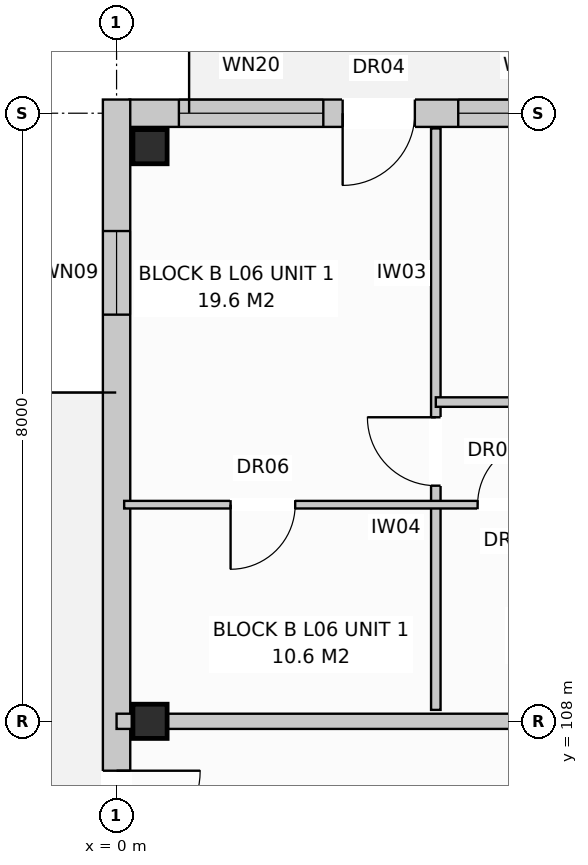
"""IFC4 building model, lengths in metres.
Left out: names, types, materials, properties, quantities, classifications, styles, units other than length and angle.
Written with IfcOpenShell. Run it as: python <this file> out.ifc"""

import sys

from ifc_helpers import new_model, si_unit, direction, frame, frame_2d, origin, origin_with_axes, origin_2d, place, context, subcontext, project, spatial, rectangle, extrude, element, fill, save


model = new_model("IFC4")
c1 = context("Model", 3, precision=1e-05, world=origin(), true_north=direction((0.0, 1.0)))
c2 = subcontext(c1, "Body", "Model", "MODEL_VIEW")
j1 = project(units=[si_unit("LENGTHUNIT", "METRE"), si_unit("PLANEANGLEUNIT", "RADIAN")], contexts=[c1])
p1 = place(None, origin())
s1 = spatial("IfcSite", under=j1, at=p1, CompositionType="ELEMENT")
p2 = place(p1, origin())
s2 = spatial("IfcBuilding", under=s1, at=p2, CompositionType="ELEMENT")
p3 = place(p2, frame((0.0, 0.0, 20.8)))
s3 = spatial("IfcBuildingStorey", under=s2, at=p3, CompositionType="ELEMENT", Elevation=20.8)
for number, where, z_axis, x_axis in (
    (1, (0.44, 108.0, 0.0), (0.0, 0.0, 1.0), (1.0, 0.0, 0.0)),
    (2, (0.44, 115.56, 0.0), (0.0, 0.0, 1.0), (1.0, 0.0, 0.0)),
):
    element("IfcColumn", number, at=place(p3, frame(where, z_axis=z_axis, x_axis=x_axis)), inside=s3, PredefinedType="COLUMN", context=c2, shape_type="SweptSolid", body=[
        extrude(rectangle(XDim=0.45, YDim=0.45, at=origin_2d()), origin(), (0.0, 0.0, 1.0), 3.2),
    ])
p4 = place(p3, frame((0.17, 116.0, 0.0), z_axis=(0.0, 0.0, 1.0), x_axis=(1.0, 0.0, 0.0)))
e3 = element("IfcWall", 3, at=p4, inside=s3, PredefinedType="STANDARD", context=c2, shape_type="SweptSolid", body=[
    extrude(rectangle(XDim=54.86, YDim=0.36, at=frame_2d((27.43, 0.0))), origin(), (0.0, 0.0, 1.0), 2.95),
])
p5 = place(p4, frame((2.804, 0.0, 0.0)))
e4 = element("IfcOpeningElement", 4, at=p5, cuts=e3, PredefinedType="OPENING", context=c2, shape_type="SweptSolid", body=[
    extrude(rectangle(XDim=0.95, YDim=2.1, at=frame_2d((0.475, 1.05))), frame((0.0, 0.192, 0.0), z_axis=(0.0, -1.0, 0.0), x_axis=(1.0, 0.0, 0.0)), (0.0, 0.0, 1.0), 0.384),
])
p6 = place(p4, frame((16.304, 0.0, 0.0)))
e5 = element("IfcOpeningElement", 5, at=p6, cuts=e3, PredefinedType="OPENING", context=c2, shape_type="SweptSolid", body=[
    extrude(rectangle(XDim=0.95, YDim=2.1, at=frame_2d((0.475, 1.05))), frame((0.0, 0.192, 0.0), z_axis=(0.0, -1.0, 0.0), x_axis=(1.0, 0.0, 0.0)), (0.0, 0.0, 1.0), 0.384),
])
p7 = place(p4, frame((30.804, 0.0, 0.0)))
e6 = element("IfcOpeningElement", 6, at=p7, cuts=e3, PredefinedType="OPENING", context=c2, shape_type="SweptSolid", body=[
    extrude(rectangle(XDim=0.95, YDim=2.1, at=frame_2d((0.475, 1.05))), frame((0.0, 0.192, 0.0), z_axis=(0.0, -1.0, 0.0), x_axis=(1.0, 0.0, 0.0)), (0.0, 0.0, 1.0), 0.384),
])
p8 = place(p4, frame((48.8, 0.0, 0.0)))
e7 = element("IfcOpeningElement", 7, at=p8, cuts=e3, PredefinedType="OPENING", context=c2, shape_type="SweptSolid", body=[
    extrude(rectangle(XDim=0.95, YDim=2.1, at=frame_2d((0.475, 1.05))), frame((0.0, 0.192, 0.0), z_axis=(0.0, -1.0, 0.0), x_axis=(1.0, 0.0, 0.0)), (0.0, 0.0, 1.0), 0.384),
])
p9 = place(p4, frame((0.65, 0.0, 0.8)))
e8 = element("IfcOpeningElement", 8, at=p9, cuts=e3, PredefinedType="OPENING", context=c2, shape_type="SweptSolid", body=[
    extrude(rectangle(XDim=1.9, YDim=1.85, at=frame_2d((0.95, 0.925))), frame((0.0, 0.192, 0.0), z_axis=(0.0, -1.0, 0.0), x_axis=(1.0, 0.0, 0.0)), (0.0, 0.0, 1.0), 0.384),
])
p10 = place(p4, frame((4.325, 0.0, 0.8)))
e9 = element("IfcOpeningElement", 9, at=p10, cuts=e3, PredefinedType="OPENING", context=c2, shape_type="SweptSolid", body=[
    extrude(rectangle(XDim=1.95, YDim=1.65, at=frame_2d((0.975, 0.825))), frame((0.0, 0.192, 0.0), z_axis=(0.0, -1.0, 0.0), x_axis=(1.0, 0.0, 0.0)), (0.0, 0.0, 1.0), 0.384),
])
p11 = place(p4, frame((10.1, 0.0, 0.8)))
e10 = element("IfcOpeningElement", 10, at=p11, cuts=e3, PredefinedType="OPENING", context=c2, shape_type="SweptSolid", body=[
    extrude(rectangle(XDim=1.8, YDim=1.7, at=frame_2d((0.9, 0.85))), frame((0.0, 0.192, 0.0), z_axis=(0.0, -1.0, 0.0), x_axis=(1.0, 0.0, 0.0)), (0.0, 0.0, 1.0), 0.384),
])
p12 = place(p4, frame((14.55, 0.0, 0.72)))
e11 = element("IfcOpeningElement", 11, at=p12, cuts=e3, PredefinedType="OPENING", context=c2, shape_type="SweptSolid", body=[
    extrude(rectangle(XDim=1.1, YDim=1.5, at=frame_2d((0.55, 0.75))), frame((0.0, 0.192, 0.0), z_axis=(0.0, -1.0, 0.0), x_axis=(1.0, 0.0, 0.0)), (0.0, 0.0, 1.0), 0.384),
])
p13 = place(p4, frame((18.025, 0.0, 0.8)))
e12 = element("IfcOpeningElement", 12, at=p13, cuts=e3, PredefinedType="OPENING", context=c2, shape_type="SweptSolid", body=[
    extrude(rectangle(XDim=1.95, YDim=1.65, at=frame_2d((0.975, 0.825))), frame((0.0, 0.192, 0.0), z_axis=(0.0, -1.0, 0.0), x_axis=(1.0, 0.0, 0.0)), (0.0, 0.0, 1.0), 0.384),
])
p14 = place(p4, frame((22.8, 0.0, 0.8)))
e13 = element("IfcOpeningElement", 13, at=p14, cuts=e3, PredefinedType="OPENING", context=c2, shape_type="SweptSolid", body=[
    extrude(rectangle(XDim=1.8, YDim=1.7, at=frame_2d((0.9, 0.85))), frame((0.0, 0.192, 0.0), z_axis=(0.0, -1.0, 0.0), x_axis=(1.0, 0.0, 0.0)), (0.0, 0.0, 1.0), 0.384),
])
p15 = place(p4, frame((28.85, 0.0, 0.72)))
e14 = element("IfcOpeningElement", 14, at=p15, cuts=e3, PredefinedType="OPENING", context=c2, shape_type="SweptSolid", body=[
    extrude(rectangle(XDim=1.1, YDim=1.5, at=frame_2d((0.55, 0.75))), frame((0.0, 0.192, 0.0), z_axis=(0.0, -1.0, 0.0), x_axis=(1.0, 0.0, 0.0)), (0.0, 0.0, 1.0), 0.384),
])
p16 = place(p4, frame((34.825, 0.0, 0.8)))
e15 = element("IfcOpeningElement", 15, at=p16, cuts=e3, PredefinedType="OPENING", context=c2, shape_type="SweptSolid", body=[
    extrude(rectangle(XDim=1.95, YDim=1.65, at=frame_2d((0.975, 0.825))), frame((0.0, 0.192, 0.0), z_axis=(0.0, -1.0, 0.0), x_axis=(1.0, 0.0, 0.0)), (0.0, 0.0, 1.0), 0.384),
])
p17 = place(p4, frame((38.3, 0.0, 0.8)))
e16 = element("IfcOpeningElement", 16, at=p17, cuts=e3, PredefinedType="OPENING", context=c2, shape_type="SweptSolid", body=[
    extrude(rectangle(XDim=1.8, YDim=1.7, at=frame_2d((0.9, 0.85))), frame((0.0, 0.192, 0.0), z_axis=(0.0, -1.0, 0.0), x_axis=(1.0, 0.0, 0.0)), (0.0, 0.0, 1.0), 0.384),
])
p18 = place(p4, frame((42.95, 0.0, 0.8)))
e17 = element("IfcOpeningElement", 17, at=p18, cuts=e3, PredefinedType="OPENING", context=c2, shape_type="SweptSolid", body=[
    extrude(rectangle(XDim=1.9, YDim=1.85, at=frame_2d((0.95, 0.925))), frame((0.0, 0.192, 0.0), z_axis=(0.0, -1.0, 0.0), x_axis=(1.0, 0.0, 0.0)), (0.0, 0.0, 1.0), 0.384),
])
p19 = place(p4, frame((51.825, 0.0, 0.8)))
e18 = element("IfcOpeningElement", 18, at=p19, cuts=e3, PredefinedType="OPENING", context=c2, shape_type="SweptSolid", body=[
    extrude(rectangle(XDim=1.95, YDim=1.65, at=frame_2d((0.975, 0.825))), frame((0.0, 0.192, 0.0), z_axis=(0.0, -1.0, 0.0), x_axis=(1.0, 0.0, 0.0)), (0.0, 0.0, 1.0), 0.384),
])
p20 = place(p3, frame((0.0, 97.42, 0.0), z_axis=(0.0, 0.0, 1.0), x_axis=(0.0, 1.0, 0.0)))
e19 = element("IfcWall", 19, at=p20, inside=s3, PredefinedType="STANDARD", context=c2, shape_type="SweptSolid", body=[
    extrude(rectangle(XDim=18.76, YDim=0.36, at=frame_2d((9.38, 0.0))), origin(), (0.0, 0.0, 1.0), 2.95),
])
p21 = place(p20, frame((8.83, 0.0, 0.0)))
e20 = element("IfcOpeningElement", 20, at=p21, cuts=e19, PredefinedType="OPENING", context=c2, shape_type="SweptSolid", body=[
    extrude(rectangle(XDim=1.1, YDim=2.1, at=frame_2d((0.55, 1.05))), frame((0.0, 0.192, 0.0), z_axis=(0.0, -1.0, 0.0), x_axis=(1.0, 0.0, 0.0)), (0.0, 0.0, 1.0), 0.384),
])
p22 = place(p20, frame((1.73, 0.0, 0.72)))
e21 = element("IfcOpeningElement", 21, at=p22, cuts=e19, PredefinedType="OPENING", context=c2, shape_type="SweptSolid", body=[
    extrude(rectangle(XDim=1.1, YDim=1.5, at=frame_2d((0.55, 0.75))), frame((0.0, 0.192, 0.0), z_axis=(0.0, -1.0, 0.0), x_axis=(1.0, 0.0, 0.0)), (0.0, 0.0, 1.0), 0.384),
])
p23 = place(p20, frame((15.93, 0.0, 0.72)))
e22 = element("IfcOpeningElement", 22, at=p23, cuts=e19, PredefinedType="OPENING", context=c2, shape_type="SweptSolid", body=[
    extrude(rectangle(XDim=1.1, YDim=1.5, at=frame_2d((0.55, 0.75))), frame((0.0, 0.192, 0.0), z_axis=(0.0, -1.0, 0.0), x_axis=(1.0, 0.0, 0.0)), (0.0, 0.0, 1.0), 0.384),
])
p24 = place(p3, frame((0.0, 108.0, 0.0), z_axis=(0.0, 0.0, 1.0), x_axis=(1.0, 0.0, 0.0)))
e23 = element("IfcWall", 23, at=p24, inside=s3, PredefinedType="PARTITIONING", context=c2, shape_type="SweptSolid", body=[
    extrude(rectangle(XDim=13.8, YDim=0.2, at=frame_2d((6.9, 0.0))), origin(), (0.0, 0.0, 1.0), 2.39),
])
p25 = place(p24, frame((9.6, 0.0, 0.0)))
e24 = element("IfcOpeningElement", 24, at=p25, cuts=e23, PredefinedType="OPENING", context=c2, shape_type="SweptSolid", body=[
    extrude(rectangle(XDim=0.95, YDim=2.15, at=frame_2d((0.475, 1.075))), frame((0.0, 0.112, 0.0), z_axis=(0.0, -1.0, 0.0), x_axis=(1.0, 0.0, 0.0)), (0.0, 0.0, 1.0), 0.224),
])
p26 = place(p3, frame((4.2, 108.15, 0.0), z_axis=(0.0, 0.0, 1.0), x_axis=(0.0, 1.0, 0.0)))
e25 = element("IfcWall", 25, at=p26, inside=s3, PredefinedType="PARTITIONING", context=c2, shape_type="SweptSolid", body=[
    extrude(rectangle(XDim=7.65, YDim=0.125, at=frame_2d((3.825, 0.0))), origin(), (0.0, 0.0, 1.0), 2.95),
])
p27 = place(p26, frame((2.95, 0.0, 0.0)))
e26 = element("IfcOpeningElement", 26, at=p27, cuts=e25, PredefinedType="OPENING", context=c2, shape_type="SweptSolid", body=[
    extrude(rectangle(XDim=0.9, YDim=2.1, at=frame_2d((0.45, 1.05))), frame((0.0, 0.074, 0.0), z_axis=(0.0, -1.0, 0.0), x_axis=(1.0, 0.0, 0.0)), (0.0, 0.0, 1.0), 0.149),
])
p28 = place(p3, frame((0.1, 110.85, 0.0), z_axis=(0.0, 0.0, 1.0), x_axis=(1.0, 0.0, 0.0)))
e27 = element("IfcWall", 27, at=p28, inside=s3, PredefinedType="PARTITIONING", context=c2, shape_type="SweptSolid", body=[
    extrude(rectangle(XDim=8.6, YDim=0.1, at=frame_2d((4.3, 0.0))), origin(), (0.0, 0.0, 1.0), 2.95),
])
p29 = place(p28, frame((1.4, 0.0, 0.0)))
e28 = element("IfcOpeningElement", 28, at=p29, cuts=e27, PredefinedType="OPENING", context=c2, shape_type="SweptSolid", body=[
    extrude(rectangle(XDim=0.85, YDim=2.05, at=frame_2d((0.425, 1.025))), frame((0.0, 0.062, 0.0), z_axis=(0.0, -1.0, 0.0), x_axis=(1.0, 0.0, 0.0)), (0.0, 0.0, 1.0), 0.124),
])
p30 = place(p28, frame((4.65, 0.0, 0.0)))
e29 = element("IfcOpeningElement", 29, at=p30, cuts=e27, PredefinedType="OPENING", context=c2, shape_type="SweptSolid", body=[
    extrude(rectangle(XDim=0.85, YDim=2.05, at=frame_2d((0.425, 1.025))), frame((0.0, 0.062, 0.0), z_axis=(0.0, -1.0, 0.0), x_axis=(1.0, 0.0, 0.0)), (0.0, 0.0, 1.0), 0.124),
])
p31 = place(p28, frame((6.8, 0.0, 0.0)))
e30 = element("IfcOpeningElement", 30, at=p31, cuts=e27, PredefinedType="OPENING", context=c2, shape_type="SweptSolid", body=[
    extrude(rectangle(XDim=0.85, YDim=2.1, at=frame_2d((0.425, 1.05))), frame((0.0, 0.062, 0.0), z_axis=(0.0, -1.0, 0.0), x_axis=(1.0, 0.0, 0.0)), (0.0, 0.0, 1.0), 0.124),
])
p32 = place(p3, frame((4.2, 112.2, 0.0), z_axis=(0.0, 0.0, 1.0), x_axis=(1.0, 0.0, 0.0)))
e31 = element("IfcWall", 31, at=p32, inside=s3, PredefinedType="PARTITIONING", context=c2, shape_type="SweptSolid", body=[
    extrude(rectangle(XDim=4.5, YDim=0.125, at=frame_2d((2.25, 0.0))), origin(), (0.0, 0.0, 1.0), 2.95),
])
p33 = place(p32, frame((1.6, 0.0, 0.0)))
e32 = element("IfcOpeningElement", 32, at=p33, cuts=e31, PredefinedType="OPENING", context=c2, shape_type="SweptSolid", body=[
    extrude(rectangle(XDim=0.9, YDim=2.1, at=frame_2d((0.45, 1.05))), frame((0.0, 0.074, 0.0), z_axis=(0.0, -1.0, 0.0), x_axis=(1.0, 0.0, 0.0)), (0.0, 0.0, 1.0), 0.149),
])
p34 = place(p5, frame((0.95, 0.0, 0.0), z_axis=(0.0, 0.0, 1.0), x_axis=(-1.0, 0.0, 0.0)))
e33 = element("IfcDoor", 33, at=p34, inside=s3, OperationType="SINGLE_SWING_LEFT", PredefinedType="DOOR", context=c2, shape_type="SweptSolid", body=[
    extrude(rectangle(XDim=0.95, YDim=2.1, at=frame_2d((0.475, 1.05))), frame((0.0, 0.025, 0.0), z_axis=(0.0, -1.0, 0.0), x_axis=(1.0, 0.0, 0.0)), (0.0, 0.0, 1.0), 0.05),
])
fill(e4, e33)
p35 = place(p9, origin_with_axes())
e34 = element("IfcWindow", 34, at=p35, inside=s3, PartitioningType="SINGLE_PANEL", PredefinedType="WINDOW", context=c2, shape_type="SweptSolid", body=[
    extrude(rectangle(XDim=1.9, YDim=1.85, at=frame_2d((0.95, 0.925))), frame((0.0, 0.03, 0.0), z_axis=(0.0, -1.0, 0.0), x_axis=(1.0, 0.0, 0.0)), (0.0, 0.0, 1.0), 0.06),
])
fill(e8, e34)
p36 = place(p10, origin_with_axes())
e35 = element("IfcWindow", 35, at=p36, inside=s3, PartitioningType="SINGLE_PANEL", PredefinedType="WINDOW", context=c2, shape_type="SweptSolid", body=[
    extrude(rectangle(XDim=1.95, YDim=1.65, at=frame_2d((0.975, 0.825))), frame((0.0, 0.03, 0.0), z_axis=(0.0, -1.0, 0.0), x_axis=(1.0, 0.0, 0.0)), (0.0, 0.0, 1.0), 0.06),
])
fill(e9, e35)
p37 = place(p21, frame((1.1, 0.0, 0.0), z_axis=(0.0, 0.0, 1.0), x_axis=(-1.0, 0.0, 0.0)))
e36 = element("IfcDoor", 36, at=p37, inside=s3, OperationType="SINGLE_SWING_RIGHT", PredefinedType="DOOR", context=c2, shape_type="SweptSolid", body=[
    extrude(rectangle(XDim=1.1, YDim=2.1, at=frame_2d((0.55, 1.05))), frame((0.0, 0.025, 0.0), z_axis=(0.0, -1.0, 0.0), x_axis=(1.0, 0.0, 0.0)), (0.0, 0.0, 1.0), 0.05),
])
fill(e20, e36)
p38 = place(p23, origin_with_axes())
e37 = element("IfcWindow", 37, at=p38, inside=s3, PartitioningType="SINGLE_PANEL", PredefinedType="WINDOW", context=c2, shape_type="SweptSolid", body=[
    extrude(rectangle(XDim=1.1, YDim=1.5, at=frame_2d((0.55, 0.75))), frame((0.0, 0.03, 0.0), z_axis=(0.0, -1.0, 0.0), x_axis=(1.0, 0.0, 0.0)), (0.0, 0.0, 1.0), 0.06),
])
fill(e22, e37)
p39 = place(p27, origin_with_axes())
e38 = element("IfcDoor", 38, at=p39, inside=s3, OperationType="SINGLE_SWING_RIGHT", PredefinedType="DOOR", context=c2, shape_type="SweptSolid", body=[
    extrude(rectangle(XDim=0.9, YDim=2.1, at=frame_2d((0.45, 1.05))), frame((0.0, 0.025, 0.0), z_axis=(0.0, -1.0, 0.0), x_axis=(1.0, 0.0, 0.0)), (0.0, 0.0, 1.0), 0.05),
])
fill(e26, e38)
p40 = place(p29, frame((0.85, 0.0, 0.0), z_axis=(0.0, 0.0, 1.0), x_axis=(-1.0, 0.0, 0.0)))
e39 = element("IfcDoor", 39, at=p40, inside=s3, OperationType="SINGLE_SWING_LEFT", PredefinedType="DOOR", context=c2, shape_type="SweptSolid", body=[
    extrude(rectangle(XDim=0.85, YDim=2.05, at=frame_2d((0.425, 1.025))), frame((0.0, 0.025, 0.0), z_axis=(0.0, -1.0, 0.0), x_axis=(1.0, 0.0, 0.0)), (0.0, 0.0, 1.0), 0.05),
])
fill(e28, e39)
p41 = place(p30, origin_with_axes())
e40 = element("IfcDoor", 40, at=p41, inside=s3, OperationType="SINGLE_SWING_RIGHT", PredefinedType="DOOR", context=c2, shape_type="SweptSolid", body=[
    extrude(rectangle(XDim=0.85, YDim=2.05, at=frame_2d((0.425, 1.025))), frame((0.0, 0.025, 0.0), z_axis=(0.0, -1.0, 0.0), x_axis=(1.0, 0.0, 0.0)), (0.0, 0.0, 1.0), 0.05),
])
fill(e29, e40)
save(model, sys.argv[1])
